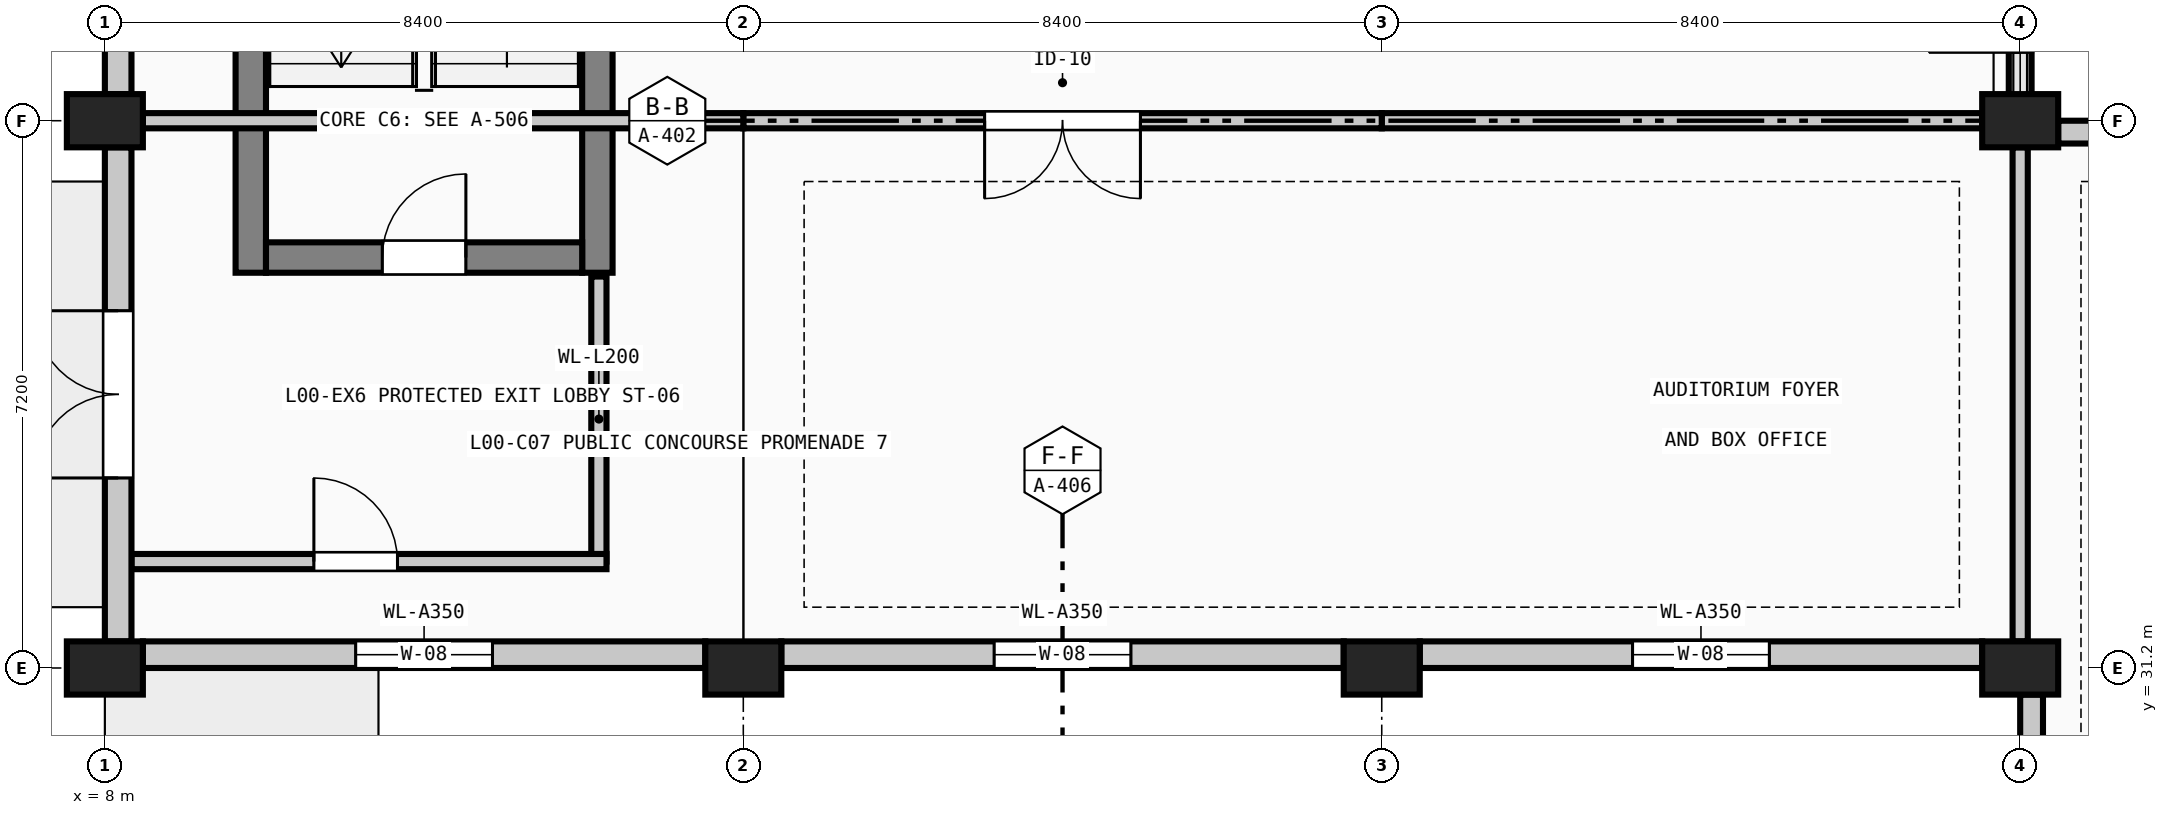
"""IFC4 building model, lengths in metres.
Left out: names, types, materials, properties, quantities, classifications, styles, units other than length and angle.
Written with IfcOpenShell. Run it as: python <this file> out.ifc"""

import sys

from ifc_helpers import new_model, si_unit, direction, frame, frame_2d, origin, origin_2d, place, context, subcontext, project, spatial, rectangle, extrude, element, fill, save


model = new_model("IFC4")
c1 = context("Model", 3, precision=1e-05, world=origin(), true_north=direction((0.0, 1.0)))
c2 = subcontext(c1, "Body", "Model", "MODEL_VIEW")
j1 = project(units=[si_unit("LENGTHUNIT", "METRE"), si_unit("PLANEANGLEUNIT", "RADIAN")], contexts=[c1])
p1 = place(None, origin())
s1 = spatial("IfcSite", under=j1, at=p1, CompositionType="ELEMENT")
p2 = place(p1, origin())
s2 = spatial("IfcBuilding", under=s1, at=p2, CompositionType="ELEMENT")
p3 = place(p2, origin())
s3 = spatial("IfcBuildingStorey", under=s2, at=p3, CompositionType="ELEMENT", Elevation=0.0)
for number, where, z_axis, x_axis in (
    (1, (8.0, 31.2, 0.0), (0.0, 0.0, 1.0), (1.0, 0.0, 0.0)),
    (2, (8.0, 38.4, 0.0), (0.0, 0.0, 1.0), (1.0, 0.0, 0.0)),
    (3, (16.4, 31.2, 0.0), (0.0, 0.0, 1.0), (1.0, 0.0, 0.0)),
    (4, (24.8, 31.2, 0.0), (0.0, 0.0, 1.0), (1.0, 0.0, 0.0)),
    (5, (33.2, 31.2, 0.0), (0.0, 0.0, 1.0), (1.0, 0.0, 0.0)),
    (6, (33.2, 38.4, 0.0), (0.0, 0.0, 1.0), (1.0, 0.0, 0.0)),
):
    element("IfcColumn", number, at=place(p3, frame(where, z_axis=z_axis, x_axis=x_axis)), inside=s3, PredefinedType="COLUMN", context=c2, shape_type="SweptSolid", body=[
        extrude(rectangle(XDim=1.0, YDim=0.7, at=origin_2d()), origin(), (0.0, 0.0, 1.0), 4.8),
    ])
for number, where, z_axis, x_axis in (
    (7, (9.92, 36.4, 0.0), (0.0, 0.0, 1.0), (0.0, 1.0, 0.0)),
    (8, (14.48, 45.6, 0.0), (0.0, 0.0, 1.0), (0.0, -1.0, 0.0)),
):
    element("IfcWall", number, at=place(p3, frame(where, z_axis=z_axis, x_axis=x_axis)), inside=s3, PredefinedType="SHEAR", context=c2, shape_type="SweptSolid", body=[
        extrude(rectangle(XDim=9.2, YDim=0.4, at=frame_2d((4.6, 0.0))), origin(), (0.0, 0.0, 1.0), 4.575),
    ])
p4 = place(p3, frame((14.28, 36.6, 0.0), z_axis=(0.0, 0.0, 1.0), x_axis=(-1.0, 0.0, 0.0)))
e9 = element("IfcWall", 9, at=p4, inside=s3, PredefinedType="SHEAR", context=c2, shape_type="SweptSolid", body=[
    extrude(rectangle(XDim=4.16, YDim=0.4, at=frame_2d((2.08, 0.0))), origin(), (0.0, 0.0, 1.0), 4.575),
])
p5 = place(p4, frame((1.53, 0.0, 0.0)))
e10 = element("IfcOpeningElement", 10, at=p5, cuts=e9, PredefinedType="OPENING", context=c2, shape_type="SweptSolid", body=[
    extrude(rectangle(XDim=1.1, YDim=2.2, at=frame_2d((0.55, 1.1))), frame((0.0, 0.21, 0.0), z_axis=(0.0, -1.0, 0.0), x_axis=(1.0, 0.0, 0.0)), (0.0, 0.0, 1.0), 0.42),
])
p6 = place(p3, frame((14.5, 32.6, 0.0), z_axis=(0.0, 0.0, 1.0), x_axis=(0.0, 1.0, 0.0)))
e11 = element("IfcWall", 11, at=p6, inside=s3, PredefinedType="SOLIDWALL", context=c2, shape_type="SweptSolid", body=[
    extrude(rectangle(XDim=3.75, YDim=0.2, at=frame_2d((1.875, 0.0))), origin(), (0.0, 0.0, 1.0), 4.525),
])
p7 = place(p3, frame((8.35, 32.6, 0.0), z_axis=(0.0, 0.0, 1.0), x_axis=(1.0, 0.0, 0.0)))
e12 = element("IfcWall", 12, at=p7, inside=s3, PredefinedType="SOLIDWALL", context=c2, shape_type="SweptSolid", body=[
    extrude(rectangle(XDim=6.25, YDim=0.2, at=frame_2d((3.125, 0.0))), origin(), (0.0, 0.0, 1.0), 4.525),
])
p8 = place(p7, frame((2.4, 0.0, 0.0)))
e13 = element("IfcOpeningElement", 13, at=p8, cuts=e12, PredefinedType="OPENING", context=c2, shape_type="SweptSolid", body=[
    extrude(rectangle(XDim=1.1, YDim=2.2, at=frame_2d((0.55, 1.1))), frame((0.0, 0.11, 0.0), z_axis=(0.0, -1.0, 0.0), x_axis=(1.0, 0.0, 0.0)), (0.0, 0.0, 1.0), 0.22),
])
p9 = place(p3, frame((33.35, 24.35, 0.0), z_axis=(0.0, 0.0, 1.0), x_axis=(0.0, 1.0, 0.0)))
e14 = element("IfcWall", 14, at=p9, inside=s3, PredefinedType="SOLIDWALL", context=c2, shape_type="SweptSolid", body=[
    extrude(rectangle(XDim=6.5, YDim=0.3, at=frame_2d((3.25, 0.0))), origin(), (0.0, 0.0, 1.0), 4.2),
])
p10 = place(p9, frame((2.35, 0.0, 2.2)))
e15 = element("IfcOpeningElement", 15, at=p10, cuts=e14, PredefinedType="OPENING", context=c2, shape_type="SweptSolid", body=[
    extrude(rectangle(XDim=1.8, YDim=1.35, at=frame_2d((0.9, 0.675))), frame((0.0, 0.16, 0.0), z_axis=(0.0, -1.0, 0.0), x_axis=(1.0, 0.0, 0.0)), (0.0, 0.0, 1.0), 0.32),
])
p11 = place(p3, frame((32.7, 31.375, 0.0), z_axis=(0.0, 0.0, 1.0), x_axis=(-1.0, 0.0, 0.0)))
e16 = element("IfcWall", 16, at=p11, inside=s3, PredefinedType="SOLIDWALL", context=c2, shape_type="SweptSolid", body=[
    extrude(rectangle(XDim=7.4, YDim=0.35, at=frame_2d((3.7, 0.0))), origin(), (0.0, 0.0, 1.0), 4.1),
])
p12 = place(p11, frame((2.8, 0.0, 2.2)))
e17 = element("IfcOpeningElement", 17, at=p12, cuts=e16, PredefinedType="OPENING", context=c2, shape_type="SweptSolid", body=[
    extrude(rectangle(XDim=1.8, YDim=1.35, at=frame_2d((0.9, 0.675))), frame((0.0, 0.185, 0.0), z_axis=(0.0, -1.0, 0.0), x_axis=(1.0, 0.0, 0.0)), (0.0, 0.0, 1.0), 0.37),
])
p13 = place(p3, frame((24.3, 31.375, 0.0), z_axis=(0.0, 0.0, 1.0), x_axis=(-1.0, 0.0, 0.0)))
e18 = element("IfcWall", 18, at=p13, inside=s3, PredefinedType="SOLIDWALL", context=c2, shape_type="SweptSolid", body=[
    extrude(rectangle(XDim=7.4, YDim=0.35, at=frame_2d((3.7, 0.0))), origin(), (0.0, 0.0, 1.0), 4.1),
])
p14 = place(p13, frame((2.8, 0.0, 2.2)))
e19 = element("IfcOpeningElement", 19, at=p14, cuts=e18, PredefinedType="OPENING", context=c2, shape_type="SweptSolid", body=[
    extrude(rectangle(XDim=1.8, YDim=1.35, at=frame_2d((0.9, 0.675))), frame((0.0, 0.185, 0.0), z_axis=(0.0, -1.0, 0.0), x_axis=(1.0, 0.0, 0.0)), (0.0, 0.0, 1.0), 0.37),
])
p15 = place(p3, frame((15.9, 31.375, 0.0), z_axis=(0.0, 0.0, 1.0), x_axis=(-1.0, 0.0, 0.0)))
e20 = element("IfcWall", 20, at=p15, inside=s3, PredefinedType="SOLIDWALL", context=c2, shape_type="SweptSolid", body=[
    extrude(rectangle(XDim=7.4, YDim=0.35, at=frame_2d((3.7, 0.0))), origin(), (0.0, 0.0, 1.0), 4.1),
])
p16 = place(p15, frame((2.8, 0.0, 2.2)))
e21 = element("IfcOpeningElement", 21, at=p16, cuts=e20, PredefinedType="OPENING", context=c2, shape_type="SweptSolid", body=[
    extrude(rectangle(XDim=1.8, YDim=1.35, at=frame_2d((0.9, 0.675))), frame((0.0, 0.185, 0.0), z_axis=(0.0, -1.0, 0.0), x_axis=(1.0, 0.0, 0.0)), (0.0, 0.0, 1.0), 0.37),
])
p17 = place(p3, frame((8.175, 31.55, 0.0), z_axis=(0.0, 0.0, 1.0), x_axis=(0.0, 1.0, 0.0)))
e22 = element("IfcWall", 22, at=p17, inside=s3, PredefinedType="SOLIDWALL", context=c2, shape_type="SweptSolid", body=[
    extrude(rectangle(XDim=6.5, YDim=0.35, at=frame_2d((3.25, 0.0))), origin(), (0.0, 0.0, 1.0), 4.525),
])
p18 = place(p17, frame((2.15, 0.0, 0.0)))
e23 = element("IfcOpeningElement", 23, at=p18, cuts=e22, PredefinedType="OPENING", context=c2, shape_type="SweptSolid", body=[
    extrude(rectangle(XDim=2.2, YDim=2.4, at=frame_2d((1.1, 1.2))), frame((0.0, 0.185, 0.0), z_axis=(0.0, -1.0, 0.0), x_axis=(1.0, 0.0, 0.0)), (0.0, 0.0, 1.0), 0.37),
])
p19 = place(p3, frame((8.175, 38.75, 0.0), z_axis=(0.0, 0.0, 1.0), x_axis=(0.0, 1.0, 0.0)))
e24 = element("IfcWall", 24, at=p19, inside=s3, PredefinedType="SOLIDWALL", context=c2, shape_type="SweptSolid", body=[
    extrude(rectangle(XDim=6.5, YDim=0.35, at=frame_2d((3.25, 0.0))), origin(), (0.0, 0.0, 1.0), 4.525),
])
p20 = place(p19, frame((2.35, 0.0, 2.2)))
e25 = element("IfcOpeningElement", 25, at=p20, cuts=e24, PredefinedType="OPENING", context=c2, shape_type="SweptSolid", body=[
    extrude(rectangle(XDim=1.8, YDim=1.35, at=frame_2d((0.9, 0.675))), frame((0.0, 0.185, 0.0), z_axis=(0.0, -1.0, 0.0), x_axis=(1.0, 0.0, 0.0)), (0.0, 0.0, 1.0), 0.37),
])
p21 = place(p3, frame((33.7, 38.25, 0.0), z_axis=(0.0, 0.0, 1.0), x_axis=(1.0, 0.0, 0.0)))
e26 = element("IfcWall", 26, at=p21, inside=s3, PredefinedType="SOLIDWALL", context=c2, shape_type="SweptSolid", body=[
    extrude(rectangle(XDim=7.5, YDim=0.3, at=frame_2d((3.75, 0.0))), origin(), (0.0, 0.0, 1.0), 4.1),
])
p22 = place(p21, frame((2.25, 0.0, 0.75)))
e27 = element("IfcOpeningElement", 27, at=p22, cuts=e26, PredefinedType="OPENING", context=c2, shape_type="SweptSolid", body=[
    extrude(rectangle(XDim=3.0, YDim=2.4, at=frame_2d((1.5, 1.2))), frame((0.0, 0.16, 0.0), z_axis=(0.0, -1.0, 0.0), x_axis=(1.0, 0.0, 0.0)), (0.0, 0.0, 1.0), 0.32),
])
p23 = place(p3, frame((33.2, 38.4, 0.0), z_axis=(0.0, 0.0, 1.0), x_axis=(0.0, 1.0, 0.0)))
e28 = element("IfcWall", 28, at=p23, inside=s3, PredefinedType="SOLIDWALL", context=c2, shape_type="SweptSolid", body=[
    extrude(rectangle(XDim=4.2, YDim=0.3, at=frame_2d((2.1, 0.0))), origin(), (0.0, 0.0, 1.0), 3.0),
])
p24 = place(p23, frame((0.9, 0.0, 0.0)))
e29 = element("IfcOpeningElement", 29, at=p24, cuts=e28, PredefinedType="OPENING", context=c2, shape_type="SweptSolid", body=[
    extrude(rectangle(XDim=2.4, YDim=2.2, at=frame_2d((1.2, 1.1))), frame((0.0, 0.16, 0.0), z_axis=(0.0, -1.0, 0.0), x_axis=(1.0, 0.0, 0.0)), (0.0, 0.0, 1.0), 0.32),
])
p25 = place(p3, frame((32.7, 38.4, 0.0), z_axis=(0.0, 0.0, 1.0), x_axis=(-1.0, 0.0, 0.0)))
e30 = element("IfcWall", 30, at=p25, inside=s3, PredefinedType="PARTITIONING", context=c2, shape_type="SweptSolid", body=[
    extrude(rectangle(XDim=7.9, YDim=0.2, at=frame_2d((3.95, 0.0))), origin(), (0.0, 0.0, 1.0), 4.525),
])
p26 = place(p3, frame((24.8, 38.4, 0.0), z_axis=(0.0, 0.0, 1.0), x_axis=(-1.0, 0.0, 0.0)))
e31 = element("IfcWall", 31, at=p26, inside=s3, PredefinedType="PARTITIONING", context=c2, shape_type="SweptSolid", body=[
    extrude(rectangle(XDim=8.4, YDim=0.2, at=frame_2d((4.2, 0.0))), origin(), (0.0, 0.0, 1.0), 4.525),
])
p27 = place(p26, frame((3.175, 0.0, 0.0)))
e32 = element("IfcOpeningElement", 32, at=p27, cuts=e31, PredefinedType="OPENING", context=c2, shape_type="SweptSolid", body=[
    extrude(rectangle(XDim=2.05, YDim=2.4, at=frame_2d((1.025, 1.2))), frame((0.0, 0.11, 0.0), z_axis=(0.0, -1.0, 0.0), x_axis=(1.0, 0.0, 0.0)), (0.0, 0.0, 1.0), 0.22),
])
p28 = place(p3, frame((16.4, 38.4, 0.0), z_axis=(0.0, 0.0, 1.0), x_axis=(-1.0, 0.0, 0.0)))
e33 = element("IfcWall", 33, at=p28, inside=s3, PredefinedType="PARTITIONING", context=c2, shape_type="SweptSolid", body=[
    extrude(rectangle(XDim=7.9, YDim=0.2, at=frame_2d((3.95, 0.0))), origin(), (0.0, 0.0, 1.0), 4.525),
])
p29 = place(p3, frame((33.2, 31.55, 0.0), z_axis=(0.0, 0.0, 1.0), x_axis=(0.0, 1.0, 0.0)))
e34 = element("IfcWall", 34, at=p29, inside=s3, PredefinedType="PARTITIONING", context=c2, shape_type="SweptSolid", body=[
    extrude(rectangle(XDim=6.5, YDim=0.2, at=frame_2d((3.25, 0.0))), origin(), (0.0, 0.0, 1.0), 4.05),
])
p30 = place(p5, frame((1.1, 0.0, 0.0), z_axis=(0.0, 0.0, 1.0), x_axis=(-1.0, 0.0, 0.0)))
e35 = element("IfcDoor", 35, at=p30, inside=s3, OperationType="SINGLE_SWING_RIGHT", PredefinedType="DOOR", context=c2, shape_type="SweptSolid", body=[
    extrude(rectangle(XDim=1.1, YDim=2.2, at=frame_2d((0.55, 1.1))), frame((0.0, 0.025, 0.0), z_axis=(0.0, -1.0, 0.0), x_axis=(1.0, 0.0, 0.0)), (0.0, 0.0, 1.0), 0.05),
])
fill(e10, e35)
p31 = place(p8, origin())
e36 = element("IfcDoor", 36, at=p31, inside=s3, OperationType="SINGLE_SWING_LEFT", PredefinedType="DOOR", context=c2, shape_type="SweptSolid", body=[
    extrude(rectangle(XDim=1.1, YDim=2.2, at=frame_2d((0.55, 1.1))), frame((0.0, 0.025, 0.0), z_axis=(0.0, -1.0, 0.0), x_axis=(1.0, 0.0, 0.0)), (0.0, 0.0, 1.0), 0.05),
])
fill(e13, e36)
p32 = place(p12, origin())
e37 = element("IfcWindow", 37, at=p32, inside=s3, PartitioningType="SINGLE_PANEL", PredefinedType="WINDOW", context=c2, shape_type="SweptSolid", body=[
    extrude(rectangle(XDim=1.8, YDim=1.35, at=frame_2d((0.9, 0.675))), frame((0.0, 0.03, 0.0), z_axis=(0.0, -1.0, 0.0), x_axis=(1.0, 0.0, 0.0)), (0.0, 0.0, 1.0), 0.06),
])
fill(e17, e37)
p33 = place(p14, origin())
e38 = element("IfcWindow", 38, at=p33, inside=s3, PartitioningType="SINGLE_PANEL", PredefinedType="WINDOW", context=c2, shape_type="SweptSolid", body=[
    extrude(rectangle(XDim=1.8, YDim=1.35, at=frame_2d((0.9, 0.675))), frame((0.0, 0.03, 0.0), z_axis=(0.0, -1.0, 0.0), x_axis=(1.0, 0.0, 0.0)), (0.0, 0.0, 1.0), 0.06),
])
fill(e19, e38)
p34 = place(p16, origin())
e39 = element("IfcWindow", 39, at=p34, inside=s3, PartitioningType="SINGLE_PANEL", PredefinedType="WINDOW", context=c2, shape_type="SweptSolid", body=[
    extrude(rectangle(XDim=1.8, YDim=1.35, at=frame_2d((0.9, 0.675))), frame((0.0, 0.03, 0.0), z_axis=(0.0, -1.0, 0.0), x_axis=(1.0, 0.0, 0.0)), (0.0, 0.0, 1.0), 0.06),
])
fill(e21, e39)
p35 = place(p18, origin())
e40 = element("IfcDoor", 40, at=p35, inside=s3, OperationType="DOUBLE_DOOR_SINGLE_SWING", PredefinedType="DOOR", context=c2, shape_type="SweptSolid", body=[
    extrude(rectangle(XDim=2.2, YDim=2.4, at=frame_2d((1.1, 1.2))), frame((0.0, 0.025, 0.0), z_axis=(0.0, -1.0, 0.0), x_axis=(1.0, 0.0, 0.0)), (0.0, 0.0, 1.0), 0.05),
])
fill(e23, e40)
p36 = place(p24, origin())
e41 = element("IfcDoor", 41, at=p36, inside=s3, OperationType="DOUBLE_DOOR_SINGLE_SWING", PredefinedType="GATE", context=c2, shape_type="SweptSolid", body=[
    extrude(rectangle(XDim=2.4, YDim=2.2, at=frame_2d((1.2, 1.1))), frame((0.0, 0.025, 0.0), z_axis=(0.0, -1.0, 0.0), x_axis=(1.0, 0.0, 0.0)), (0.0, 0.0, 1.0), 0.05),
])
fill(e29, e41)
p37 = place(p27, origin())
e42 = element("IfcDoor", 42, at=p37, inside=s3, OperationType="DOUBLE_DOOR_SINGLE_SWING", PredefinedType="DOOR", context=c2, shape_type="SweptSolid", body=[
    extrude(rectangle(XDim=2.05, YDim=2.4, at=frame_2d((1.025, 1.2))), frame((0.0, 0.025, 0.0), z_axis=(0.0, -1.0, 0.0), x_axis=(1.0, 0.0, 0.0)), (0.0, 0.0, 1.0), 0.05),
])
fill(e32, e42)
save(model, sys.argv[1])
